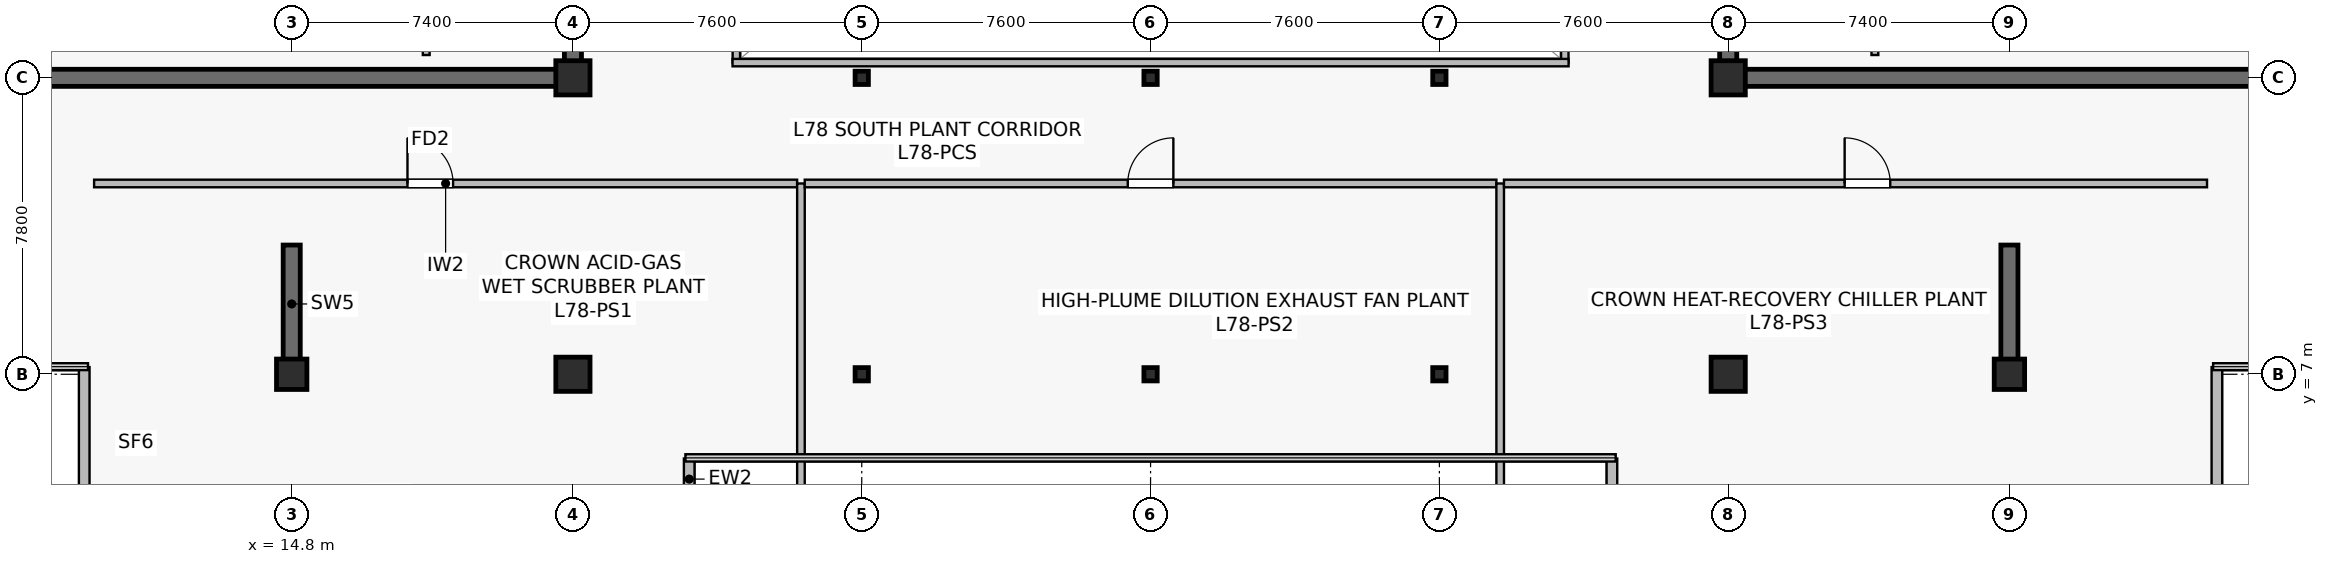
"""IFC4 building model, lengths in metres.
Left out: names, types, materials, properties, quantities, classifications, styles, units other than length and angle.
Written with IfcOpenShell. Run it as: python <this file> out.ifc"""

import sys

from ifc_helpers import new_model, si_unit, direction, frame, frame_2d, origin, origin_2d, place, context, subcontext, project, spatial, rectangle, i_section, extrude, source, transform, mapped, element, fill, save


model = new_model("IFC4")
c1 = context("Model", 3, precision=1e-05, world=origin(), true_north=direction((0.0, 1.0)))
c2 = subcontext(c1, "Body", "Model", "MODEL_VIEW")
j1 = project(units=[si_unit("LENGTHUNIT", "METRE"), si_unit("PLANEANGLEUNIT", "RADIAN")], contexts=[c1])
p1 = place(None, origin())
s1 = spatial("IfcSite", under=j1, at=p1, CompositionType="ELEMENT")
p2 = place(p1, origin())
s2 = spatial("IfcBuilding", under=s1, at=p2, CompositionType="ELEMENT")
p3 = place(p2, frame((0.0, 0.0, 327.0)))
s3 = spatial("IfcBuildingStorey", under=s2, at=p3, CompositionType="ELEMENT", Elevation=327.0)
p4 = place(p3, frame((7.175, 14.8, 0.0), z_axis=(0.0, 0.0, 1.0), x_axis=(1.0, 0.0, 0.0)))
e1 = element("IfcWall", 1, at=p4, inside=s3, PredefinedType="SHEAR", context=c2, shape_type="SweptSolid", body=[
    extrude(rectangle(XDim=15.25, YDim=0.45, at=frame_2d((7.625, 0.0))), origin(), (0.0, 0.0, 1.0), 5.12),
])
p5 = place(p3, frame((22.2, 15.025, 0.0), z_axis=(0.0, 0.0, 1.0), x_axis=(0.0, 1.0, 0.0)))
e2 = element("IfcWall", 2, at=p5, inside=s3, PredefinedType="SHEAR", context=c2, shape_type="SweptSolid", body=[
    extrude(rectangle(XDim=18.55, YDim=0.45, at=frame_2d((9.275, 0.0))), origin(), (0.0, 0.0, 1.0), 5.12),
])
p6 = place(p5, frame((3.525, 0.0, 0.0)))
e3 = element("IfcOpeningElement", 3, at=p6, cuts=e2, PredefinedType="OPENING", context=c2, shape_type="SweptSolid", body=[
    extrude(rectangle(XDim=1.42, YDim=2.2, at=frame_2d((0.71, 1.1))), frame((0.0, 0.235, 0.0), z_axis=(0.0, -1.0, 0.0), x_axis=(1.0, 0.0, 0.0)), (0.0, 0.0, 1.0), 0.47),
])
p7 = place(p3, frame((52.375, 14.8, 0.0), z_axis=(0.0, 0.0, 1.0), x_axis=(1.0, 0.0, 0.0)))
e4 = element("IfcWall", 4, at=p7, inside=s3, PredefinedType="SHEAR", context=c2, shape_type="SweptSolid", body=[
    extrude(rectangle(XDim=15.25, YDim=0.45, at=frame_2d((7.625, 0.0))), origin(), (0.0, 0.0, 1.0), 5.12),
])
p8 = place(p3, frame((52.6, 15.025, 0.0), z_axis=(0.0, 0.0, 1.0), x_axis=(0.0, 1.0, 0.0)))
e5 = element("IfcWall", 5, at=p8, inside=s3, PredefinedType="SHEAR", context=c2, shape_type="SweptSolid", body=[
    extrude(rectangle(XDim=18.55, YDim=0.45, at=frame_2d((9.275, 0.0))), origin(), (0.0, 0.0, 1.0), 5.12),
])
p9 = place(p8, frame((3.525, 0.0, 0.0)))
e6 = element("IfcOpeningElement", 6, at=p9, cuts=e5, PredefinedType="OPENING", context=c2, shape_type="SweptSolid", body=[
    extrude(rectangle(XDim=1.42, YDim=2.2, at=frame_2d((0.71, 1.1))), frame((0.0, 0.235, 0.0), z_axis=(0.0, -1.0, 0.0), x_axis=(1.0, 0.0, 0.0)), (0.0, 0.0, 1.0), 0.47),
])
for number, where, z_axis, x_axis in (
    (7, (14.8, 7.3, 0.0), (0.0, 0.0, 1.0), (0.0, 1.0, 0.0)),
    (8, (60.0, 7.3, 0.0), (0.0, 0.0, 1.0), (0.0, 1.0, 0.0)),
):
    element("IfcWall", number, at=place(p3, frame(where, z_axis=z_axis, x_axis=x_axis)), inside=s3, PredefinedType="SHEAR", context=c2, shape_type="SweptSolid", body=[
        extrude(rectangle(XDim=3.1, YDim=0.45, at=frame_2d((1.55, 0.0))), origin(), (0.0, 0.0, 1.0), 5.12),
    ])
m1 = source(origin(), c2, "Body", "SweptSolid", [
    extrude(rectangle(XDim=0.8, YDim=0.8, at=origin_2d()), origin(), (0.0, 0.0, 1.0), 5.4),
])
p10 = place(p3, frame((14.8, 7.0, 0.0), z_axis=(0.0, 0.0, 1.0), x_axis=(1.0, 0.0, 0.0)))
e9 = element("IfcColumn", 9, at=p10, inside=s3, PredefinedType="COLUMN", context=c2, shape_type="MappedRepresentation", body=[
    mapped(m1, transform((0.0, 0.0, 0.0), scale=1.0)),
])
m2 = source(origin(), c2, "Body", "SweptSolid", [
    extrude(rectangle(XDim=0.9, YDim=0.9, at=origin_2d()), origin(), (0.0, 0.0, 1.0), 5.4),
])
for number, where, z_axis, x_axis in (
    (10, (22.2, 7.0, 0.0), (0.0, 0.0, 1.0), (1.0, 0.0, 0.0)),
    (11, (22.2, 14.8, 0.0), (0.0, 0.0, 1.0), (1.0, 0.0, 0.0)),
    (12, (52.6, 7.0, 0.0), (0.0, 0.0, 1.0), (1.0, 0.0, 0.0)),
):
    element("IfcColumn", number, at=place(p3, frame(where, z_axis=z_axis, x_axis=x_axis)), inside=s3, PredefinedType="COLUMN", context=c2, shape_type="MappedRepresentation", body=[
        mapped(m2, transform((0.0, 0.0, 0.0), scale=1.0)),
    ])
p11 = place(p3, frame((60.0, 7.0, 0.0), z_axis=(0.0, 0.0, 1.0), x_axis=(1.0, 0.0, 0.0)))
e13 = element("IfcColumn", 13, at=p11, inside=s3, PredefinedType="COLUMN", context=c2, shape_type="MappedRepresentation", body=[
    mapped(m1, transform((0.0, 0.0, 0.0), scale=1.0)),
])
p12 = place(p3, frame((52.6, 14.8, 0.0), z_axis=(0.0, 0.0, 1.0), x_axis=(1.0, 0.0, 0.0)))
e14 = element("IfcColumn", 14, at=p12, inside=s3, PredefinedType="COLUMN", context=c2, shape_type="MappedRepresentation", body=[
    mapped(m2, transform((0.0, 0.0, 0.0), scale=1.0)),
])
m3 = source(origin(), c2, "Body", "SweptSolid", [
    extrude(i_section(OverallWidth=0.35, OverallDepth=0.35, WebThickness=0.012, FlangeThickness=0.019, at=origin_2d()), origin(), (0.0, 0.0, 1.0), 5.4),
])
for number, where, z_axis, x_axis in (
    (15, (29.8, 7.0, 0.0), (0.0, 0.0, 1.0), (1.0, 0.0, 0.0)),
    (16, (29.8, 14.8, 0.0), (0.0, 0.0, 1.0), (1.0, 0.0, 0.0)),
    (17, (37.4, 7.0, 0.0), (0.0, 0.0, 1.0), (1.0, 0.0, 0.0)),
    (18, (37.4, 14.8, 0.0), (0.0, 0.0, 1.0), (1.0, 0.0, 0.0)),
    (19, (45.0, 7.0, 0.0), (0.0, 0.0, 1.0), (1.0, 0.0, 0.0)),
    (20, (45.0, 14.8, 0.0), (0.0, 0.0, 1.0), (1.0, 0.0, 0.0)),
):
    element("IfcColumn", number, at=place(p3, frame(where, z_axis=z_axis, x_axis=x_axis)), inside=s3, PredefinedType="COLUMN", context=c2, shape_type="MappedRepresentation", body=[
        mapped(m3, transform((0.0, 0.0, 0.0), scale=1.0)),
    ])
for number, where, z_axis, x_axis in (
    (21, (25.26, 3.7, 0.0), (0.0, 0.0, 1.0), (0.0, 1.0, 0.0)),
    (22, (49.54, 4.783, 0.0), (0.0, 0.0, 1.0), (0.0, -1.0, 0.0)),
):
    element("IfcWall", number, at=place(p3, frame(where, z_axis=z_axis, x_axis=x_axis)), inside=s3, PredefinedType="STANDARD", context=c2, shape_type="SweptSolid", body=[
        extrude(rectangle(XDim=1.083, YDim=0.28, at=frame_2d((0.542, 0.0))), origin(), (0.0, 0.0, 1.0), 5.12),
    ])
for number, where, z_axis, x_axis in (
    (23, (65.46, 3.7, 0.0), (0.0, 0.0, 1.0), (0.0, 1.0, 0.0)),
    (24, (9.34, 7.188, 0.0), (0.0, 0.0, 1.0), (0.0, -1.0, 0.0)),
):
    element("IfcWall", number, at=place(p3, frame(where, z_axis=z_axis, x_axis=x_axis)), inside=s3, PredefinedType="STANDARD", context=c2, shape_type="SweptSolid", body=[
        extrude(rectangle(XDim=3.488, YDim=0.28, at=frame_2d((1.744, 0.0))), origin(), (0.0, 0.0, 1.0), 5.12),
    ])
for number, where, z_axis, x_axis in (
    (25, (18.34, 15.4, 0.0), (0.0, 0.0, 1.0), (0.0, 1.0, 0.0)),
    (26, (56.46, 15.4, 0.0), (0.0, 0.0, 1.0), (0.0, 1.0, 0.0)),
):
    element("IfcWall", number, at=place(p3, frame(where, z_axis=z_axis, x_axis=x_axis)), inside=s3, PredefinedType="SOLIDWALL", context=c2, shape_type="SweptSolid", body=[
        extrude(rectangle(XDim=2.4, YDim=0.18, at=frame_2d((1.2, 0.0))), origin(), (0.0, 0.0, 1.0), 5.12),
    ])
p13 = place(p3, frame((26.5, 15.2, 0.0), z_axis=(0.0, 0.0, 1.0), x_axis=(0.0, 1.0, 0.0)))
e27 = element("IfcWall", 27, at=p13, inside=s3, PredefinedType="SOLIDWALL", context=c2, shape_type="SweptSolid", body=[
    extrude(rectangle(XDim=18.2, YDim=0.195, at=frame_2d((9.1, 0.0))), origin(), (0.0, 0.0, 1.0), 5.12),
])
p14 = place(p13, frame((1.8, 0.0, 0.9)))
e28 = element("IfcOpeningElement", 28, at=p14, cuts=e27, PredefinedType="OPENING", context=c2, shape_type="SweptSolid", body=[
    extrude(rectangle(XDim=1.5, YDim=1.4, at=frame_2d((0.75, 0.7))), frame((0.0, 0.107, 0.0), z_axis=(0.0, -1.0, 0.0), x_axis=(1.0, 0.0, 0.0)), (0.0, 0.0, 1.0), 0.215),
])
p15 = place(p13, frame((13.2, 0.0, 0.9)))
e29 = element("IfcOpeningElement", 29, at=p15, cuts=e27, PredefinedType="OPENING", context=c2, shape_type="SweptSolid", body=[
    extrude(rectangle(XDim=1.5, YDim=1.4, at=frame_2d((0.75, 0.7))), frame((0.0, 0.107, 0.0), z_axis=(0.0, -1.0, 0.0), x_axis=(1.0, 0.0, 0.0)), (0.0, 0.0, 1.0), 0.215),
])
p16 = place(p3, frame((48.3, 15.2, 0.0), z_axis=(0.0, 0.0, 1.0), x_axis=(0.0, 1.0, 0.0)))
e30 = element("IfcWall", 30, at=p16, inside=s3, PredefinedType="SOLIDWALL", context=c2, shape_type="SweptSolid", body=[
    extrude(rectangle(XDim=18.2, YDim=0.195, at=frame_2d((9.1, 0.0))), origin(), (0.0, 0.0, 1.0), 5.12),
])
p17 = place(p16, frame((1.8, 0.0, 0.9)))
e31 = element("IfcOpeningElement", 31, at=p17, cuts=e30, PredefinedType="OPENING", context=c2, shape_type="SweptSolid", body=[
    extrude(rectangle(XDim=1.5, YDim=1.4, at=frame_2d((0.75, 0.7))), frame((0.0, 0.107, 0.0), z_axis=(0.0, -1.0, 0.0), x_axis=(1.0, 0.0, 0.0)), (0.0, 0.0, 1.0), 0.215),
])
p18 = place(p16, frame((13.2, 0.0, 0.9)))
e32 = element("IfcOpeningElement", 32, at=p18, cuts=e30, PredefinedType="OPENING", context=c2, shape_type="SweptSolid", body=[
    extrude(rectangle(XDim=1.5, YDim=1.4, at=frame_2d((0.75, 0.7))), frame((0.0, 0.107, 0.0), z_axis=(0.0, -1.0, 0.0), x_axis=(1.0, 0.0, 0.0)), (0.0, 0.0, 1.0), 0.215),
])
p19 = place(p3, frame((26.4, 15.2, 0.0), z_axis=(0.0, 0.0, 1.0), x_axis=(1.0, 0.0, 0.0)))
e33 = element("IfcWall", 33, at=p19, inside=s3, PredefinedType="SOLIDWALL", context=c2, shape_type="SweptSolid", body=[
    extrude(rectangle(XDim=22.0, YDim=0.195, at=frame_2d((11.0, 0.0))), origin(), (0.0, 0.0, 1.0), 5.12),
])
p20 = place(p3, frame((9.6, 12.02, 0.0), z_axis=(0.0, 0.0, 1.0), x_axis=(1.0, 0.0, 0.0)))
e34 = element("IfcWall", 34, at=p20, inside=s3, PredefinedType="SOLIDWALL", context=c2, shape_type="SweptSolid", body=[
    extrude(rectangle(XDim=18.5, YDim=0.2, at=frame_2d((9.25, 0.0))), origin(), (0.0, 0.0, 1.0), 4.517),
])
p21 = place(p20, frame((8.246, 0.0, 0.0)))
e35 = element("IfcOpeningElement", 35, at=p21, cuts=e34, PredefinedType="OPENING", context=c2, shape_type="SweptSolid", body=[
    extrude(rectangle(XDim=1.2, YDim=2.16, at=frame_2d((0.6, 1.08))), frame((0.0, 0.11, 0.0), z_axis=(0.0, -1.0, 0.0), x_axis=(1.0, 0.0, 0.0)), (0.0, 0.0, 1.0), 0.22),
])
p22 = place(p3, frame((28.2, 3.81, 0.0), z_axis=(0.0, 0.0, 1.0), x_axis=(0.0, 1.0, 0.0)))
e36 = element("IfcWall", 36, at=p22, inside=s3, PredefinedType="SOLIDWALL", context=c2, shape_type="SweptSolid", body=[
    extrude(rectangle(XDim=8.21, YDim=0.2, at=frame_2d((4.105, 0.0))), origin(), (0.0, 0.0, 1.0), 4.455),
])
p23 = place(p3, frame((28.3, 12.02, 0.0), z_axis=(0.0, 0.0, 1.0), x_axis=(1.0, 0.0, 0.0)))
e37 = element("IfcWall", 37, at=p23, inside=s3, PredefinedType="SOLIDWALL", context=c2, shape_type="SweptSolid", body=[
    extrude(rectangle(XDim=18.2, YDim=0.2, at=frame_2d((9.1, 0.0))), origin(), (0.0, 0.0, 1.0), 4.517),
])
p24 = place(p23, frame((8.5, 0.0, 0.0)))
e38 = element("IfcOpeningElement", 38, at=p24, cuts=e37, PredefinedType="OPENING", context=c2, shape_type="SweptSolid", body=[
    extrude(rectangle(XDim=1.2, YDim=2.16, at=frame_2d((0.6, 1.08))), frame((0.0, 0.11, 0.0), z_axis=(0.0, -1.0, 0.0), x_axis=(1.0, 0.0, 0.0)), (0.0, 0.0, 1.0), 0.22),
])
p25 = place(p3, frame((46.6, 3.81, 0.0), z_axis=(0.0, 0.0, 1.0), x_axis=(0.0, 1.0, 0.0)))
e39 = element("IfcWall", 39, at=p25, inside=s3, PredefinedType="SOLIDWALL", context=c2, shape_type="SweptSolid", body=[
    extrude(rectangle(XDim=8.21, YDim=0.2, at=frame_2d((4.105, 0.0))), origin(), (0.0, 0.0, 1.0), 4.455),
])
p26 = place(p3, frame((46.7, 12.02, 0.0), z_axis=(0.0, 0.0, 1.0), x_axis=(1.0, 0.0, 0.0)))
e40 = element("IfcWall", 40, at=p26, inside=s3, PredefinedType="SOLIDWALL", context=c2, shape_type="SweptSolid", body=[
    extrude(rectangle(XDim=18.5, YDim=0.2, at=frame_2d((9.25, 0.0))), origin(), (0.0, 0.0, 1.0), 4.517),
])
p27 = place(p26, frame((8.964, 0.0, 0.0)))
e41 = element("IfcOpeningElement", 41, at=p27, cuts=e40, PredefinedType="OPENING", context=c2, shape_type="SweptSolid", body=[
    extrude(rectangle(XDim=1.2, YDim=2.16, at=frame_2d((0.6, 1.08))), frame((0.0, 0.11, 0.0), z_axis=(0.0, -1.0, 0.0), x_axis=(1.0, 0.0, 0.0)), (0.0, 0.0, 1.0), 0.22),
])
m4 = source(origin(), c2, "Body", "SweptSolid", [
    extrude(rectangle(XDim=1.2, YDim=2.16, at=frame_2d((0.6, 1.08))), frame((0.0, 0.025, 0.0), z_axis=(0.0, -1.0, 0.0), x_axis=(1.0, 0.0, 0.0)), (0.0, 0.0, 1.0), 0.05),
])
p28 = place(p21, origin())
e42 = element("IfcDoor", 42, at=p28, inside=s3, OperationType="SINGLE_SWING_LEFT", PredefinedType="DOOR", context=c2, shape_type="MappedRepresentation", body=[
    mapped(m4, transform((0.0, 0.0, 0.0), scale=1.0)),
])
fill(e35, e42)
p29 = place(p24, origin())
e43 = element("IfcDoor", 43, at=p29, inside=s3, OperationType="SINGLE_SWING_RIGHT", PredefinedType="DOOR", context=c2, shape_type="MappedRepresentation", body=[
    mapped(m4, transform((0.0, 0.0, 0.0), scale=1.0)),
])
fill(e38, e43)
p30 = place(p27, origin())
e44 = element("IfcDoor", 44, at=p30, inside=s3, OperationType="SINGLE_SWING_LEFT", PredefinedType="DOOR", context=c2, shape_type="MappedRepresentation", body=[
    mapped(m4, transform((0.0, 0.0, 0.0), scale=1.0)),
])
fill(e41, e44)
save(model, sys.argv[1])
